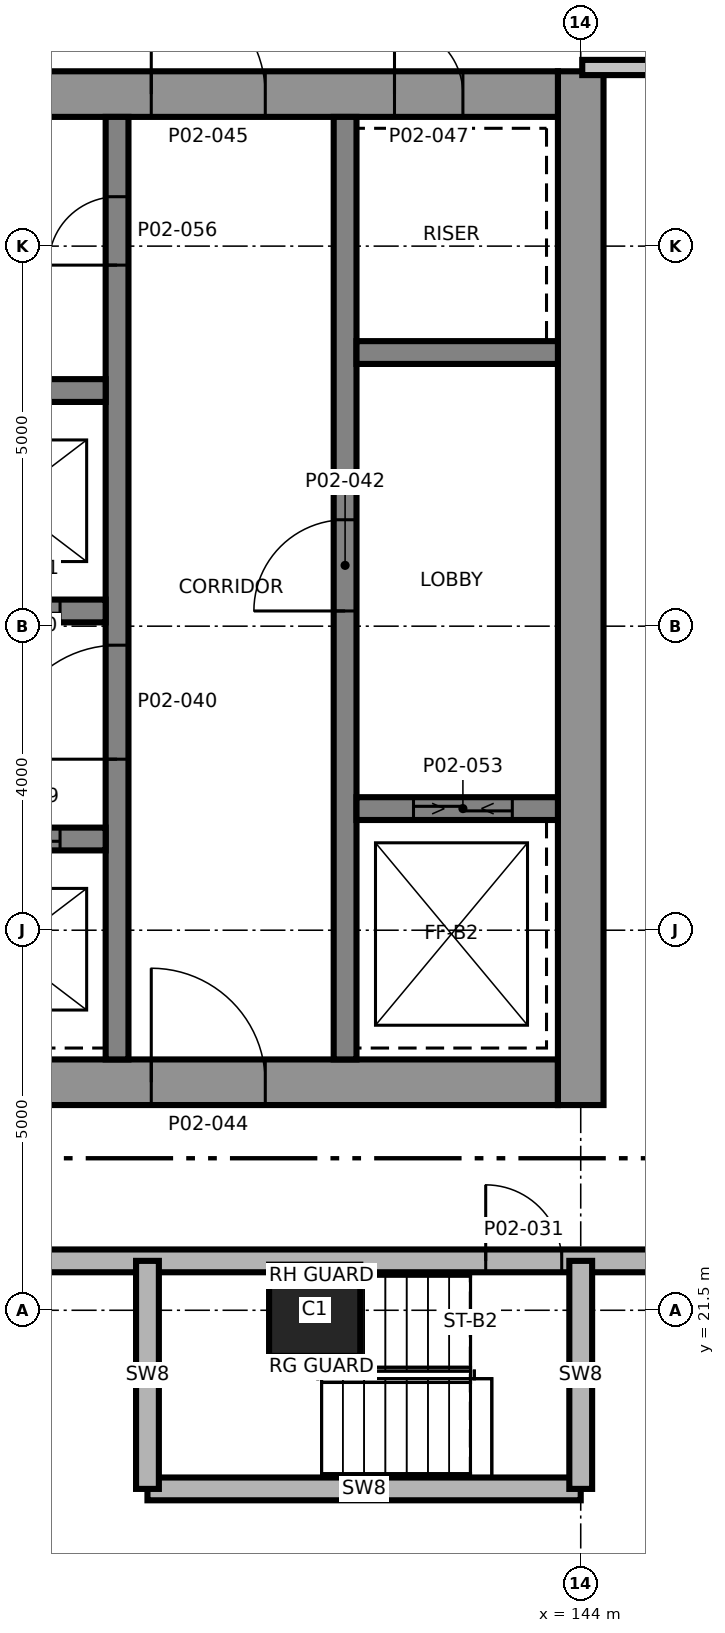
"""IFC4 building model, lengths in metres.
Left out: names, types, materials, properties, quantities, classifications, styles, units other than length and angle.
Written with IfcOpenShell. Run it as: python <this file> out.ifc"""

import sys

from ifc_helpers import new_model, si_unit, direction, frame, frame_2d, origin, origin_2d, place, context, subcontext, project, spatial, rectangle, extrude, element, fill, save


model = new_model("IFC4")
c1 = context("Model", 3, precision=1e-05, world=origin(), true_north=direction((0.0, 1.0)))
c2 = subcontext(c1, "Body", "Model", "MODEL_VIEW")
j1 = project(units=[si_unit("LENGTHUNIT", "METRE"), si_unit("PLANEANGLEUNIT", "RADIAN")], contexts=[c1])
p1 = place(None, origin())
s1 = spatial("IfcSite", under=j1, at=p1, CompositionType="ELEMENT")
p2 = place(p1, origin())
s2 = spatial("IfcBuilding", under=s1, at=p2, CompositionType="ELEMENT")
p3 = place(p2, frame((0.0, 0.0, 13.5)))
s3 = spatial("IfcBuildingStorey", under=s2, at=p3, CompositionType="ELEMENT", Elevation=13.5)
p4 = place(p3, frame((128.7, 24.5, 0.0), z_axis=(0.0, 0.0, 1.0), x_axis=(1.0, 0.0, 0.0)))
e1 = element("IfcWall", 1, at=p4, inside=s3, PredefinedType="SHEAR", context=c2, shape_type="SweptSolid", body=[
    extrude(rectangle(XDim=15.0, YDim=0.6, at=frame_2d((7.5, 0.0))), origin(), (0.0, 0.0, 1.0), 5.0),
])
p5 = place(p4, frame((9.65, 0.0, 0.0)))
e2 = element("IfcOpeningElement", 2, at=p5, cuts=e1, PredefinedType="OPENING", context=c2, shape_type="SweptSolid", body=[
    extrude(rectangle(XDim=1.5, YDim=2.1, at=frame_2d((0.75, 1.05))), frame((0.0, 0.31, 0.0), z_axis=(0.0, -1.0, 0.0), x_axis=(1.0, 0.0, 0.0)), (0.0, 0.0, 1.0), 0.62),
])
p6 = place(p4, frame((1.25, 0.0, 0.0)))
e3 = element("IfcOpeningElement", 3, at=p6, cuts=e1, PredefinedType="OPENING", context=c2, shape_type="SweptSolid", body=[
    extrude(rectangle(XDim=0.9, YDim=2.1, at=frame_2d((0.45, 1.05))), frame((0.0, 0.31, 0.0), z_axis=(0.0, -1.0, 0.0), x_axis=(1.0, 0.0, 0.0)), (0.0, 0.0, 1.0), 0.62),
])
p7 = place(p3, frame((144.0, 24.2, 0.0), z_axis=(0.0, 0.0, 1.0), x_axis=(0.0, 1.0, 0.0)))
e4 = element("IfcWall", 4, at=p7, inside=s3, PredefinedType="SHEAR", context=c2, shape_type="SweptSolid", body=[
    extrude(rectangle(XDim=13.6, YDim=0.6, at=frame_2d((6.8, 0.0))), origin(), (0.0, 0.0, 1.0), 5.0),
])
p8 = place(p3, frame((128.7, 37.5, 0.0), z_axis=(0.0, 0.0, 1.0), x_axis=(1.0, 0.0, 0.0)))
e5 = element("IfcWall", 5, at=p8, inside=s3, PredefinedType="SHEAR", context=c2, shape_type="SweptSolid", body=[
    extrude(rectangle(XDim=15.0, YDim=0.6, at=frame_2d((7.5, 0.0))), origin(), (0.0, 0.0, 1.0), 5.0),
])
p9 = place(p8, frame((9.65, 0.0, 0.0)))
e6 = element("IfcOpeningElement", 6, at=p9, cuts=e5, PredefinedType="OPENING", context=c2, shape_type="SweptSolid", body=[
    extrude(rectangle(XDim=1.5, YDim=2.1, at=frame_2d((0.75, 1.05))), frame((0.0, 0.31, 0.0), z_axis=(0.0, -1.0, 0.0), x_axis=(1.0, 0.0, 0.0)), (0.0, 0.0, 1.0), 0.62),
])
p10 = place(p8, frame((12.85, 0.0, 0.0)))
e7 = element("IfcOpeningElement", 7, at=p10, cuts=e5, PredefinedType="OPENING", context=c2, shape_type="SweptSolid", body=[
    extrude(rectangle(XDim=0.9, YDim=2.1, at=frame_2d((0.45, 1.05))), frame((0.0, 0.31, 0.0), z_axis=(0.0, -1.0, 0.0), x_axis=(1.0, 0.0, 0.0)), (0.0, 0.0, 1.0), 0.62),
])
p11 = place(p8, frame((3.8, 0.0, 0.0)))
e8 = element("IfcOpeningElement", 8, at=p11, cuts=e5, PredefinedType="OPENING", context=c2, shape_type="SweptSolid", body=[
    extrude(rectangle(XDim=0.9, YDim=2.1, at=frame_2d((0.45, 1.05))), frame((0.0, 0.31, 0.0), z_axis=(0.0, -1.0, 0.0), x_axis=(1.0, 0.0, 0.0)), (0.0, 0.0, 1.0), 0.62),
])
p12 = place(p8, frame((6.7, 0.0, 0.0)))
e9 = element("IfcOpeningElement", 9, at=p12, cuts=e5, PredefinedType="OPENING", context=c2, shape_type="SweptSolid", body=[
    extrude(rectangle(XDim=0.9, YDim=2.1, at=frame_2d((0.45, 1.05))), frame((0.0, 0.31, 0.0), z_axis=(0.0, -1.0, 0.0), x_axis=(1.0, 0.0, 0.0)), (0.0, 0.0, 1.0), 0.62),
])
p13 = place(p3, frame((137.9, 24.8, 0.0), z_axis=(0.0, 0.0, 1.0), x_axis=(0.0, 1.0, 0.0)))
e10 = element("IfcWall", 10, at=p13, inside=s3, PredefinedType="SHEAR", context=c2, shape_type="SweptSolid", body=[
    extrude(rectangle(XDim=12.4, YDim=0.3, at=frame_2d((6.2, 0.0))), origin(), (0.0, 0.0, 1.0), 5.0),
])
p14 = place(p13, frame((3.95, 0.0, 0.0)))
e11 = element("IfcOpeningElement", 11, at=p14, cuts=e10, PredefinedType="OPENING", context=c2, shape_type="SweptSolid", body=[
    extrude(rectangle(XDim=1.5, YDim=2.1, at=frame_2d((0.75, 1.05))), frame((0.0, 0.16, 0.0), z_axis=(0.0, -1.0, 0.0), x_axis=(1.0, 0.0, 0.0)), (0.0, 0.0, 1.0), 0.32),
])
p15 = place(p13, frame((10.45, 0.0, 0.0)))
e12 = element("IfcOpeningElement", 12, at=p15, cuts=e10, PredefinedType="OPENING", context=c2, shape_type="SweptSolid", body=[
    extrude(rectangle(XDim=0.9, YDim=2.1, at=frame_2d((0.45, 1.05))), frame((0.0, 0.16, 0.0), z_axis=(0.0, -1.0, 0.0), x_axis=(1.0, 0.0, 0.0)), (0.0, 0.0, 1.0), 0.32),
])
p16 = place(p3, frame((140.9, 24.8, 0.0), z_axis=(0.0, 0.0, 1.0), x_axis=(0.0, 1.0, 0.0)))
e13 = element("IfcWall", 13, at=p16, inside=s3, PredefinedType="SHEAR", context=c2, shape_type="SweptSolid", body=[
    extrude(rectangle(XDim=12.4, YDim=0.3, at=frame_2d((6.2, 0.0))), origin(), (0.0, 0.0, 1.0), 5.0),
])
p17 = place(p16, frame((5.9, 0.0, 0.0)))
e14 = element("IfcOpeningElement", 14, at=p17, cuts=e13, PredefinedType="OPENING", context=c2, shape_type="SweptSolid", body=[
    extrude(rectangle(XDim=1.2, YDim=2.1, at=frame_2d((0.6, 1.05))), frame((0.0, 0.16, 0.0), z_axis=(0.0, -1.0, 0.0), x_axis=(1.0, 0.0, 0.0)), (0.0, 0.0, 1.0), 0.32),
])
p18 = place(p3, frame((132.25, 27.7, 0.0), z_axis=(0.0, 0.0, 1.0), x_axis=(1.0, 0.0, 0.0)))
e15 = element("IfcWall", 15, at=p18, inside=s3, PredefinedType="SHEAR", context=c2, shape_type="SweptSolid", body=[
    extrude(rectangle(XDim=5.5, YDim=0.3, at=frame_2d((2.75, 0.0))), origin(), (0.0, 0.0, 1.0), 5.0),
])
p19 = place(p18, frame((0.9, 0.0, 0.0)))
e16 = element("IfcOpeningElement", 16, at=p19, cuts=e15, PredefinedType="OPENING", context=c2, shape_type="SweptSolid", body=[
    extrude(rectangle(XDim=1.1, YDim=2.4, at=frame_2d((0.55, 1.2))), frame((0.0, 0.16, 0.0), z_axis=(0.0, -1.0, 0.0), x_axis=(1.0, 0.0, 0.0)), (0.0, 0.0, 1.0), 0.32),
])
p20 = place(p18, frame((3.8, 0.0, 0.0)))
e17 = element("IfcOpeningElement", 17, at=p20, cuts=e15, PredefinedType="OPENING", context=c2, shape_type="SweptSolid", body=[
    extrude(rectangle(XDim=1.1, YDim=2.4, at=frame_2d((0.55, 1.2))), frame((0.0, 0.16, 0.0), z_axis=(0.0, -1.0, 0.0), x_axis=(1.0, 0.0, 0.0)), (0.0, 0.0, 1.0), 0.32),
])
p21 = place(p3, frame((132.25, 30.7, 0.0), z_axis=(0.0, 0.0, 1.0), x_axis=(1.0, 0.0, 0.0)))
e18 = element("IfcWall", 18, at=p21, inside=s3, PredefinedType="SHEAR", context=c2, shape_type="SweptSolid", body=[
    extrude(rectangle(XDim=5.5, YDim=0.3, at=frame_2d((2.75, 0.0))), origin(), (0.0, 0.0, 1.0), 5.0),
])
p22 = place(p21, frame((0.9, 0.0, 0.0)))
e19 = element("IfcOpeningElement", 19, at=p22, cuts=e18, PredefinedType="OPENING", context=c2, shape_type="SweptSolid", body=[
    extrude(rectangle(XDim=1.1, YDim=2.4, at=frame_2d((0.55, 1.2))), frame((0.0, 0.16, 0.0), z_axis=(0.0, -1.0, 0.0), x_axis=(1.0, 0.0, 0.0)), (0.0, 0.0, 1.0), 0.32),
])
p23 = place(p21, frame((3.8, 0.0, 0.0)))
e20 = element("IfcOpeningElement", 20, at=p23, cuts=e18, PredefinedType="OPENING", context=c2, shape_type="SweptSolid", body=[
    extrude(rectangle(XDim=1.1, YDim=2.4, at=frame_2d((0.55, 1.2))), frame((0.0, 0.16, 0.0), z_axis=(0.0, -1.0, 0.0), x_axis=(1.0, 0.0, 0.0)), (0.0, 0.0, 1.0), 0.32),
])
p24 = place(p3, frame((132.25, 33.6, 0.0), z_axis=(0.0, 0.0, 1.0), x_axis=(1.0, 0.0, 0.0)))
e21 = element("IfcWall", 21, at=p24, inside=s3, PredefinedType="SHEAR", context=c2, shape_type="SweptSolid", body=[
    extrude(rectangle(XDim=5.5, YDim=0.3, at=frame_2d((2.75, 0.0))), origin(), (0.0, 0.0, 1.0), 5.0),
])
p25 = place(p3, frame((141.05, 28.1, 0.0), z_axis=(0.0, 0.0, 1.0), x_axis=(1.0, 0.0, 0.0)))
e22 = element("IfcWall", 22, at=p25, inside=s3, PredefinedType="SHEAR", context=c2, shape_type="SweptSolid", body=[
    extrude(rectangle(XDim=2.65, YDim=0.3, at=frame_2d((1.325, 0.0))), origin(), (0.0, 0.0, 1.0), 5.0),
])
p26 = place(p25, frame((0.75, 0.0, 0.0)))
e23 = element("IfcOpeningElement", 23, at=p26, cuts=e22, PredefinedType="OPENING", context=c2, shape_type="SweptSolid", body=[
    extrude(rectangle(XDim=1.3, YDim=2.4, at=frame_2d((0.65, 1.2))), frame((0.0, 0.16, 0.0), z_axis=(0.0, -1.0, 0.0), x_axis=(1.0, 0.0, 0.0)), (0.0, 0.0, 1.0), 0.32),
])
p27 = place(p3, frame((141.05, 34.1, 0.0), z_axis=(0.0, 0.0, 1.0), x_axis=(1.0, 0.0, 0.0)))
e24 = element("IfcWall", 24, at=p27, inside=s3, PredefinedType="SHEAR", context=c2, shape_type="SweptSolid", body=[
    extrude(rectangle(XDim=2.65, YDim=0.3, at=frame_2d((1.325, 0.0))), origin(), (0.0, 0.0, 1.0), 5.0),
])
p28 = place(p3, frame((140.5, 21.5, 0.0), z_axis=(0.0, 0.0, 1.0), x_axis=(1.0, 0.0, 0.0)))
e25 = element("IfcColumn", 25, at=p28, inside=s3, PredefinedType="COLUMN", context=c2, shape_type="SweptSolid", body=[
    extrude(rectangle(XDim=1.2, YDim=1.2, at=origin_2d()), origin(), (0.0, 0.0, 1.0), 5.0),
])
p29 = place(p3, frame((138.3, 19.15, 0.0), z_axis=(0.0, 0.0, 1.0), x_axis=(1.0, 0.0, 0.0)))
e26 = element("IfcWall", 26, at=p29, inside=s3, PredefinedType="SHEAR", context=c2, shape_type="SweptSolid", body=[
    extrude(rectangle(XDim=5.7, YDim=0.3, at=frame_2d((2.85, 0.0))), origin(), (0.0, 0.0, 1.0), 4.7),
])
p30 = place(p3, frame((125.75, 22.15, 0.0), z_axis=(0.0, 0.0, 1.0), x_axis=(1.0, 0.0, 0.0)))
e27 = element("IfcWall", 27, at=p30, inside=s3, PredefinedType="SHEAR", context=c2, shape_type="SweptSolid", body=[
    extrude(rectangle(XDim=21.5, YDim=0.3, at=frame_2d((10.75, 0.0))), origin(), (0.0, 0.0, 1.0), 4.7),
])
p31 = place(p30, frame((17.0, 0.0, 0.0)))
e28 = element("IfcOpeningElement", 28, at=p31, cuts=e27, PredefinedType="OPENING", context=c2, shape_type="SweptSolid", body=[
    extrude(rectangle(XDim=1.0, YDim=2.1, at=frame_2d((0.5, 1.05))), frame((0.0, 0.16, 0.0), z_axis=(0.0, -1.0, 0.0), x_axis=(1.0, 0.0, 0.0)), (0.0, 0.0, 1.0), 0.32),
])
p32 = place(p30, frame((3.15, 0.0, 0.0)))
e29 = element("IfcOpeningElement", 29, at=p32, cuts=e27, PredefinedType="OPENING", context=c2, shape_type="SweptSolid", body=[
    extrude(rectangle(XDim=1.6, YDim=2.1, at=frame_2d((0.8, 1.05))), frame((0.0, 0.16, 0.0), z_axis=(0.0, -1.0, 0.0), x_axis=(1.0, 0.0, 0.0)), (0.0, 0.0, 1.0), 0.32),
])
p33 = place(p3, frame((144.02, 37.85, 0.0), z_axis=(0.0, 0.0, 1.0), x_axis=(1.0, 0.0, 0.0)))
e30 = element("IfcWall", 30, at=p33, inside=s3, PredefinedType="PARTITIONING", context=c2, shape_type="SweptSolid", body=[
    extrude(rectangle(XDim=3.23, YDim=0.2, at=frame_2d((1.615, 0.0))), origin(), (0.0, 0.0, 1.0), 4.7),
])
p34 = place(p33, frame((1.03, 0.0, 0.0)))
e31 = element("IfcOpeningElement", 31, at=p34, cuts=e30, PredefinedType="OPENING", context=c2, shape_type="SweptSolid", body=[
    extrude(rectangle(XDim=1.5, YDim=2.1, at=frame_2d((0.75, 1.05))), frame((0.0, 0.11, 0.0), z_axis=(0.0, -1.0, 0.0), x_axis=(1.0, 0.0, 0.0)), (0.0, 0.0, 1.0), 0.22),
])
for number, where, z_axis, x_axis in (
    (32, (138.3, 19.15, 0.0), (0.0, 0.0, 1.0), (0.0, 1.0, 0.0)),
    (33, (144.0, 19.15, 0.0), (0.0, 0.0, 1.0), (0.0, 1.0, 0.0)),
):
    element("IfcWall", number, at=place(p3, frame(where, z_axis=z_axis, x_axis=x_axis)), inside=s3, PredefinedType="SHEAR", context=c2, shape_type="SweptSolid", body=[
        extrude(rectangle(XDim=3.0, YDim=0.3, at=frame_2d((1.5, 0.0))), origin(), (0.0, 0.0, 1.0), 4.7),
    ])
p35 = place(p31, origin())
e34 = element("IfcDoor", 34, at=p35, inside=s3, OperationType="SINGLE_SWING_LEFT", PredefinedType="DOOR", context=c2, shape_type="SweptSolid", body=[
    extrude(rectangle(XDim=1.0, YDim=2.1, at=frame_2d((0.5, 1.05))), frame((0.0, 0.025, 0.0), z_axis=(0.0, -1.0, 0.0), x_axis=(1.0, 0.0, 0.0)), (0.0, 0.0, 1.0), 0.05),
])
fill(e28, e34)
p36 = place(p14, origin())
e35 = element("IfcDoor", 35, at=p36, inside=s3, OperationType="SINGLE_SWING_RIGHT", PredefinedType="DOOR", context=c2, shape_type="SweptSolid", body=[
    extrude(rectangle(XDim=1.5, YDim=2.1, at=frame_2d((0.75, 1.05))), frame((0.0, 0.025, 0.0), z_axis=(0.0, -1.0, 0.0), x_axis=(1.0, 0.0, 0.0)), (0.0, 0.0, 1.0), 0.05),
])
fill(e11, e35)
p37 = place(p17, origin())
e36 = element("IfcDoor", 36, at=p37, inside=s3, OperationType="SINGLE_SWING_RIGHT", PredefinedType="DOOR", context=c2, shape_type="SweptSolid", body=[
    extrude(rectangle(XDim=1.2, YDim=2.1, at=frame_2d((0.6, 1.05))), frame((0.0, 0.025, 0.0), z_axis=(0.0, -1.0, 0.0), x_axis=(1.0, 0.0, 0.0)), (0.0, 0.0, 1.0), 0.05),
])
fill(e14, e36)
p38 = place(p5, origin())
e37 = element("IfcDoor", 37, at=p38, inside=s3, OperationType="SINGLE_SWING_LEFT", PredefinedType="DOOR", context=c2, shape_type="SweptSolid", body=[
    extrude(rectangle(XDim=1.5, YDim=2.1, at=frame_2d((0.75, 1.05))), frame((0.0, 0.025, 0.0), z_axis=(0.0, -1.0, 0.0), x_axis=(1.0, 0.0, 0.0)), (0.0, 0.0, 1.0), 0.05),
])
fill(e2, e37)
p39 = place(p9, origin())
e38 = element("IfcDoor", 38, at=p39, inside=s3, OperationType="SINGLE_SWING_RIGHT", PredefinedType="DOOR", context=c2, shape_type="SweptSolid", body=[
    extrude(rectangle(XDim=1.5, YDim=2.1, at=frame_2d((0.75, 1.05))), frame((0.0, 0.025, 0.0), z_axis=(0.0, -1.0, 0.0), x_axis=(1.0, 0.0, 0.0)), (0.0, 0.0, 1.0), 0.05),
])
fill(e6, e38)
p40 = place(p10, origin())
e39 = element("IfcDoor", 39, at=p40, inside=s3, OperationType="SINGLE_SWING_RIGHT", PredefinedType="DOOR", context=c2, shape_type="SweptSolid", body=[
    extrude(rectangle(XDim=0.9, YDim=2.1, at=frame_2d((0.45, 1.05))), frame((0.0, 0.025, 0.0), z_axis=(0.0, -1.0, 0.0), x_axis=(1.0, 0.0, 0.0)), (0.0, 0.0, 1.0), 0.05),
])
fill(e7, e39)
p41 = place(p20, origin())
e40 = element("IfcDoor", 40, at=p41, inside=s3, OperationType="SLIDING_TO_LEFT", PredefinedType="DOOR", context=c2, shape_type="SweptSolid", body=[
    extrude(rectangle(XDim=1.1, YDim=2.4, at=frame_2d((0.55, 1.2))), frame((0.0, 0.025, 0.0), z_axis=(0.0, -1.0, 0.0), x_axis=(1.0, 0.0, 0.0)), (0.0, 0.0, 1.0), 0.05),
])
fill(e17, e40)
p42 = place(p23, origin())
e41 = element("IfcDoor", 41, at=p42, inside=s3, OperationType="SLIDING_TO_LEFT", PredefinedType="DOOR", context=c2, shape_type="SweptSolid", body=[
    extrude(rectangle(XDim=1.1, YDim=2.4, at=frame_2d((0.55, 1.2))), frame((0.0, 0.025, 0.0), z_axis=(0.0, -1.0, 0.0), x_axis=(1.0, 0.0, 0.0)), (0.0, 0.0, 1.0), 0.05),
])
fill(e20, e41)
p43 = place(p26, origin())
e42 = element("IfcDoor", 42, at=p43, inside=s3, OperationType="SLIDING_TO_LEFT", PredefinedType="DOOR", context=c2, shape_type="SweptSolid", body=[
    extrude(rectangle(XDim=1.3, YDim=2.4, at=frame_2d((0.65, 1.2))), frame((0.0, 0.025, 0.0), z_axis=(0.0, -1.0, 0.0), x_axis=(1.0, 0.0, 0.0)), (0.0, 0.0, 1.0), 0.05),
])
fill(e23, e42)
p44 = place(p15, origin())
e43 = element("IfcDoor", 43, at=p44, inside=s3, OperationType="SINGLE_SWING_RIGHT", PredefinedType="DOOR", context=c2, shape_type="SweptSolid", body=[
    extrude(rectangle(XDim=0.9, YDim=2.1, at=frame_2d((0.45, 1.05))), frame((0.0, 0.025, 0.0), z_axis=(0.0, -1.0, 0.0), x_axis=(1.0, 0.0, 0.0)), (0.0, 0.0, 1.0), 0.05),
])
fill(e12, e43)
save(model, sys.argv[1])
